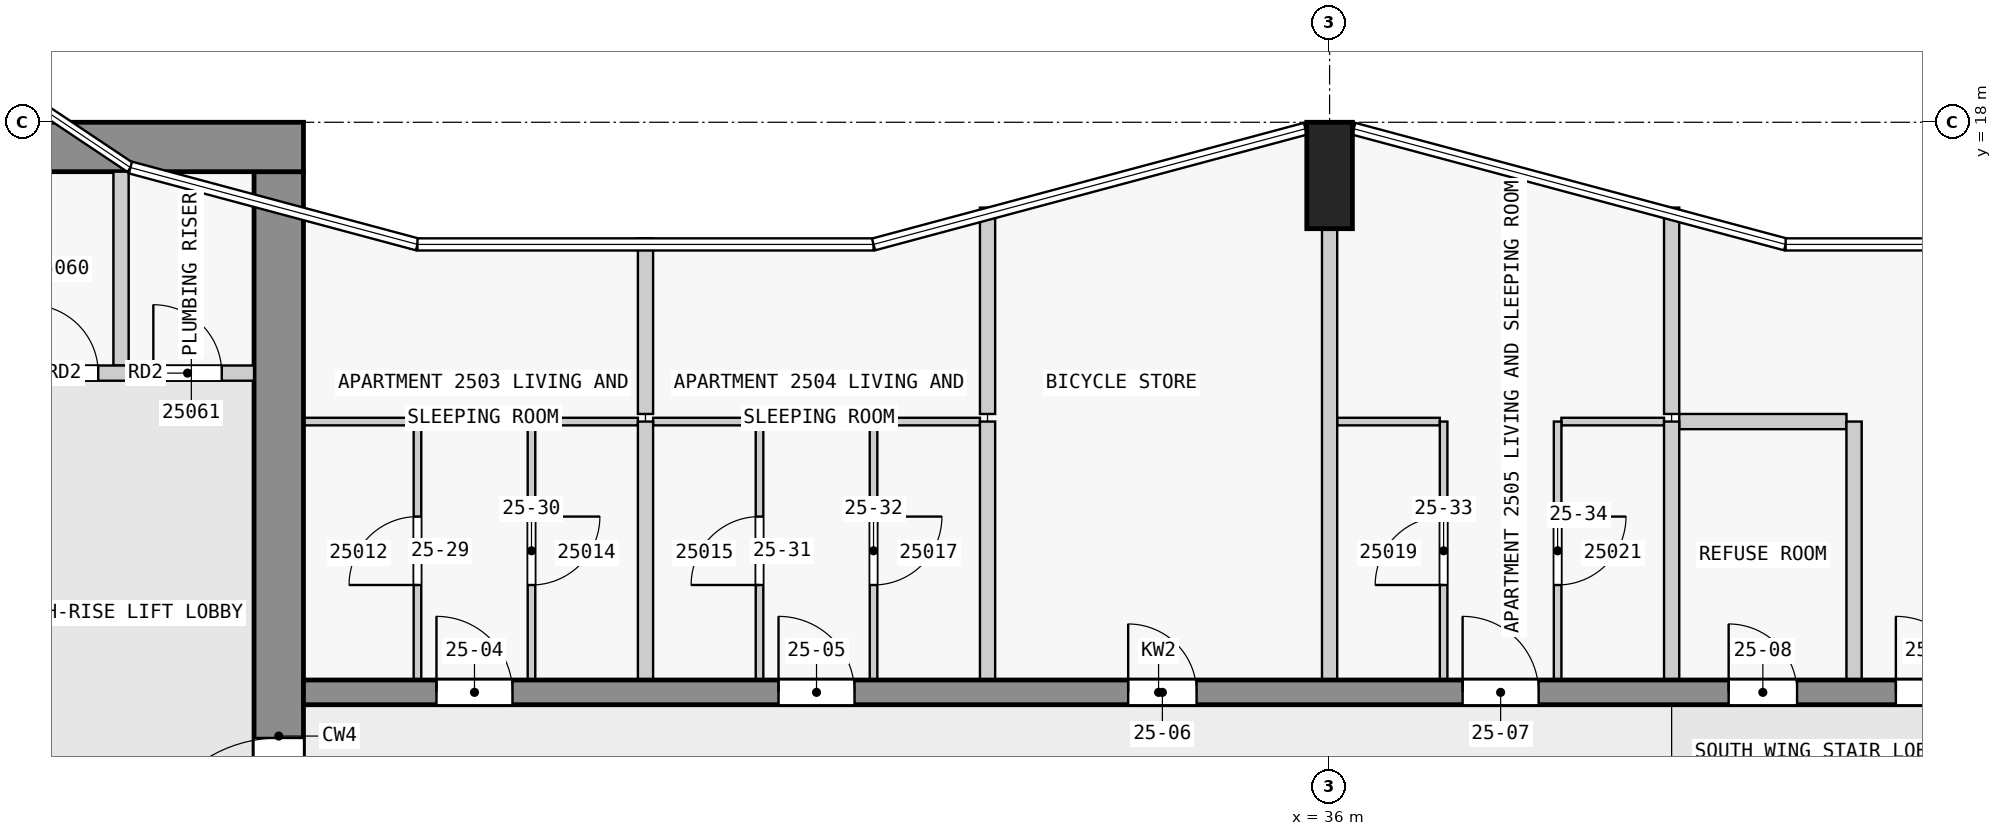
"""IFC4 building model, lengths in metres.
Left out: names, types, materials, properties, quantities, classifications, styles, units other than length and angle.
Written with IfcOpenShell. Run it as: python <this file> out.ifc"""

import sys

from ifc_helpers import new_model, si_unit, direction, frame, frame_2d, origin, origin_2d, place, context, subcontext, project, spatial, rectangle, extrude, element, fill, save


model = new_model("IFC4")
c1 = context("Model", 3, precision=1e-05, world=origin(), true_north=direction((0.0, 1.0)))
c2 = subcontext(c1, "Body", "Model", "MODEL_VIEW")
j1 = project(units=[si_unit("LENGTHUNIT", "METRE"), si_unit("PLANEANGLEUNIT", "RADIAN")], contexts=[c1])
p1 = place(None, origin())
s1 = spatial("IfcSite", under=j1, at=p1, CompositionType="ELEMENT")
p2 = place(p1, origin())
s2 = spatial("IfcBuilding", under=s1, at=p2, CompositionType="ELEMENT")
p3 = place(p2, frame((0.0, 0.0, 99.3)))
s3 = spatial("IfcBuildingStorey", under=s2, at=p3, CompositionType="ELEMENT", Elevation=99.3)
p4 = place(p3, frame((36.0, 17.3, 0.0), z_axis=(0.0, 0.0, 1.0), x_axis=(1.0, 0.0, 0.0)))
e1 = element("IfcColumn", 1, at=p4, inside=s3, PredefinedType="COLUMN", context=c2, shape_type="SweptSolid", body=[
    extrude(rectangle(XDim=0.6, YDim=1.4, at=origin_2d()), origin(), (0.0, 0.0, 1.0), 3.5),
])
p5 = place(p3, frame((1.65, 17.675, 0.0), z_axis=(0.0, 0.0, 1.0), x_axis=(1.0, 0.0, 0.0)))
e2 = element("IfcWall", 2, at=p5, inside=s3, PredefinedType="SHEAR", context=c2, shape_type="SweptSolid", body=[
    extrude(rectangle(XDim=20.85, YDim=0.65, at=frame_2d((10.425, 0.0))), origin(), (0.0, 0.0, 1.0), 3.25),
])
p6 = place(p5, frame((6.45, 0.0, 0.0)))
e3 = element("IfcOpeningElement", 3, at=p6, cuts=e2, PredefinedType="OPENING", context=c2, shape_type="SweptSolid", body=[
    extrude(rectangle(XDim=1.8, YDim=2.1, at=frame_2d((0.9, 1.05))), frame((0.0, 0.335, 0.0), z_axis=(0.0, -1.0, 0.0), x_axis=(1.0, 0.0, 0.0)), (0.0, 0.0, 1.0), 0.67),
])
p7 = place(p3, frame((22.175, 2.5, 0.0), z_axis=(0.0, 0.0, 1.0), x_axis=(0.0, 1.0, 0.0)))
e4 = element("IfcWall", 4, at=p7, inside=s3, PredefinedType="SHEAR", context=c2, shape_type="SweptSolid", body=[
    extrude(rectangle(XDim=14.85, YDim=0.65, at=frame_2d((7.425, 0.0))), origin(), (0.0, 0.0, 1.0), 3.25),
])
p8 = place(p7, frame((5.6, 0.0, 0.0)))
e5 = element("IfcOpeningElement", 5, at=p8, cuts=e4, PredefinedType="OPENING", context=c2, shape_type="SweptSolid", body=[
    extrude(rectangle(XDim=1.8, YDim=2.1, at=frame_2d((0.9, 1.05))), frame((0.0, 0.335, 0.0), z_axis=(0.0, -1.0, 0.0), x_axis=(1.0, 0.0, 0.0)), (0.0, 0.0, 1.0), 0.67),
])
p9 = place(p3, frame((22.5, 10.5, 0.0), z_axis=(0.0, 0.0, 1.0), x_axis=(1.0, 0.0, 0.0)))
e6 = element("IfcWall", 6, at=p9, inside=s3, PredefinedType="SHEAR", context=c2, shape_type="SweptSolid", body=[
    extrude(rectangle(XDim=22.5, YDim=0.325, at=frame_2d((11.25, 0.0))), origin(), (0.0, 0.0, 1.0), 3.25),
])
p10 = place(p9, frame((1.75, 0.0, 0.0)))
e7 = element("IfcOpeningElement", 7, at=p10, cuts=e6, PredefinedType="OPENING", context=c2, shape_type="SweptSolid", body=[
    extrude(rectangle(XDim=1.0, YDim=2.1, at=frame_2d((0.5, 1.05))), frame((0.0, 0.172, 0.0), z_axis=(0.0, -1.0, 0.0), x_axis=(1.0, 0.0, 0.0)), (0.0, 0.0, 1.0), 0.345),
])
p11 = place(p9, frame((6.25, 0.0, 0.0)))
e8 = element("IfcOpeningElement", 8, at=p11, cuts=e6, PredefinedType="OPENING", context=c2, shape_type="SweptSolid", body=[
    extrude(rectangle(XDim=1.0, YDim=2.1, at=frame_2d((0.5, 1.05))), frame((0.0, 0.172, 0.0), z_axis=(0.0, -1.0, 0.0), x_axis=(1.0, 0.0, 0.0)), (0.0, 0.0, 1.0), 0.345),
])
p12 = place(p9, frame((10.85, 0.0, 0.0)))
e9 = element("IfcOpeningElement", 9, at=p12, cuts=e6, PredefinedType="OPENING", context=c2, shape_type="SweptSolid", body=[
    extrude(rectangle(XDim=0.9, YDim=2.1, at=frame_2d((0.45, 1.05))), frame((0.0, 0.172, 0.0), z_axis=(0.0, -1.0, 0.0), x_axis=(1.0, 0.0, 0.0)), (0.0, 0.0, 1.0), 0.345),
])
p13 = place(p9, frame((15.25, 0.0, 0.0)))
e10 = element("IfcOpeningElement", 10, at=p13, cuts=e6, PredefinedType="OPENING", context=c2, shape_type="SweptSolid", body=[
    extrude(rectangle(XDim=1.0, YDim=2.1, at=frame_2d((0.5, 1.05))), frame((0.0, 0.172, 0.0), z_axis=(0.0, -1.0, 0.0), x_axis=(1.0, 0.0, 0.0)), (0.0, 0.0, 1.0), 0.345),
])
p14 = place(p9, frame((18.75, 0.0, 0.0)))
e11 = element("IfcOpeningElement", 11, at=p14, cuts=e6, PredefinedType="OPENING", context=c2, shape_type="SweptSolid", body=[
    extrude(rectangle(XDim=0.9, YDim=2.1, at=frame_2d((0.45, 1.05))), frame((0.0, 0.172, 0.0), z_axis=(0.0, -1.0, 0.0), x_axis=(1.0, 0.0, 0.0)), (0.0, 0.0, 1.0), 0.345),
])
p15 = place(p9, frame((20.95, 0.0, 0.0)))
e12 = element("IfcOpeningElement", 12, at=p15, cuts=e6, PredefinedType="OPENING", context=c2, shape_type="SweptSolid", body=[
    extrude(rectangle(XDim=1.0, YDim=2.1, at=frame_2d((0.5, 1.05))), frame((0.0, 0.172, 0.0), z_axis=(0.0, -1.0, 0.0), x_axis=(1.0, 0.0, 0.0)), (0.0, 0.0, 1.0), 0.345),
])
p16 = place(p3, frame((18.6, 14.7, 0.0), z_axis=(0.0, 0.0, 1.0), x_axis=(1.0, 0.0, 0.0)))
e13 = element("IfcWall", 13, at=p16, inside=s3, PredefinedType="PARTITIONING", context=c2, shape_type="SweptSolid", body=[
    extrude(rectangle(XDim=3.25, YDim=0.2, at=frame_2d((1.625, 0.0))), origin(), (0.0, 0.0, 1.0), 3.25),
])
p17 = place(p16, frame((0.3, 0.0, 0.0)))
e14 = element("IfcOpeningElement", 14, at=p17, cuts=e13, PredefinedType="OPENING", context=c2, shape_type="SweptSolid", body=[
    extrude(rectangle(XDim=0.9, YDim=2.1, at=frame_2d((0.45, 1.05))), frame((0.0, 0.11, 0.0), z_axis=(0.0, -1.0, 0.0), x_axis=(1.0, 0.0, 0.0)), (0.0, 0.0, 1.0), 0.22),
])
p18 = place(p16, frame((1.925, 0.0, 0.0)))
e15 = element("IfcOpeningElement", 15, at=p18, cuts=e13, PredefinedType="OPENING", context=c2, shape_type="SweptSolid", body=[
    extrude(rectangle(XDim=0.9, YDim=2.1, at=frame_2d((0.45, 1.05))), frame((0.0, 0.11, 0.0), z_axis=(0.0, -1.0, 0.0), x_axis=(1.0, 0.0, 0.0)), (0.0, 0.0, 1.0), 0.22),
])
p19 = place(p3, frame((20.1, 14.8, 0.0), z_axis=(0.0, 0.0, 1.0), x_axis=(0.0, 1.0, 0.0)))
e16 = element("IfcWall", 16, at=p19, inside=s3, PredefinedType="PARTITIONING", context=c2, shape_type="SweptSolid", body=[
    extrude(rectangle(XDim=2.55, YDim=0.2, at=frame_2d((1.275, 0.0))), origin(), (0.0, 0.0, 1.0), 3.25),
])
p20 = place(p3, frame((23.95, 14.062, 0.0), z_axis=(0.0, 0.0, 1.0), x_axis=(-1.0, 0.0, 0.0)))
e17 = element("IfcWall", 17, at=p20, inside=s3, PredefinedType="PARTITIONING", context=c2, shape_type="SweptSolid", body=[
    extrude(rectangle(XDim=1.45, YDim=0.1, at=frame_2d((0.725, 0.0))), origin(), (0.0, 0.0, 1.0), 3.25),
])
for number, where, z_axis, x_axis in (
    (18, (26.9, 14.062, 0.0), (0.0, 0.0, 1.0), (-1.0, 0.0, 0.0)),
    (19, (28.45, 14.062, 0.0), (0.0, 0.0, 1.0), (-1.0, 0.0, 0.0)),
    (20, (31.4, 14.062, 0.0), (0.0, 0.0, 1.0), (-1.0, 0.0, 0.0)),
    (21, (37.45, 14.062, 0.0), (0.0, 0.0, 1.0), (-1.0, 0.0, 0.0)),
    (22, (40.4, 14.062, 0.0), (0.0, 0.0, 1.0), (-1.0, 0.0, 0.0)),
):
    element("IfcWall", number, at=place(p3, frame(where, z_axis=z_axis, x_axis=x_axis)), inside=s3, PredefinedType="PARTITIONING", context=c2, shape_type="SweptSolid", body=[
        extrude(rectangle(XDim=1.35, YDim=0.1, at=frame_2d((0.675, 0.0))), origin(), (0.0, 0.0, 1.0), 3.25),
    ])
p21 = place(p3, frame((42.8, 14.062, 0.0), z_axis=(0.0, 0.0, 1.0), x_axis=(-1.0, 0.0, 0.0)))
e23 = element("IfcWall", 23, at=p21, inside=s3, PredefinedType="PARTITIONING", context=c2, shape_type="SweptSolid", body=[
    extrude(rectangle(XDim=2.2, YDim=0.2, at=frame_2d((1.1, 0.0))), origin(), (0.0, 0.0, 1.0), 3.25),
])
p22 = place(p3, frame((24.0, 10.663, 0.0), z_axis=(0.0, 0.0, 1.0), x_axis=(0.0, 1.0, 0.0)))
e24 = element("IfcWall", 24, at=p22, inside=s3, PredefinedType="PARTITIONING", context=c2, shape_type="SweptSolid", body=[
    extrude(rectangle(XDim=3.4, YDim=0.1, at=frame_2d((1.7, 0.0))), origin(), (0.0, 0.0, 1.0), 3.25),
])
p23 = place(p22, frame((1.25, 0.0, 0.0)))
e25 = element("IfcOpeningElement", 25, at=p23, cuts=e24, PredefinedType="OPENING", context=c2, shape_type="SweptSolid", body=[
    extrude(rectangle(XDim=0.9, YDim=2.1, at=frame_2d((0.45, 1.05))), frame((0.0, 0.06, 0.0), z_axis=(0.0, -1.0, 0.0), x_axis=(1.0, 0.0, 0.0)), (0.0, 0.0, 1.0), 0.12),
])
p24 = place(p3, frame((25.5, 14.062, 0.0), z_axis=(0.0, 0.0, 1.0), x_axis=(0.0, -1.0, 0.0)))
e26 = element("IfcWall", 26, at=p24, inside=s3, PredefinedType="PARTITIONING", context=c2, shape_type="SweptSolid", body=[
    extrude(rectangle(XDim=3.4, YDim=0.1, at=frame_2d((1.7, 0.0))), origin(), (0.0, 0.0, 1.0), 3.25),
])
p25 = place(p24, frame((1.25, 0.0, 0.0)))
e27 = element("IfcOpeningElement", 27, at=p25, cuts=e26, PredefinedType="OPENING", context=c2, shape_type="SweptSolid", body=[
    extrude(rectangle(XDim=0.9, YDim=2.1, at=frame_2d((0.45, 1.05))), frame((0.0, 0.06, 0.0), z_axis=(0.0, -1.0, 0.0), x_axis=(1.0, 0.0, 0.0)), (0.0, 0.0, 1.0), 0.12),
])
p26 = place(p3, frame((27.0, 16.473, 0.0), z_axis=(0.0, 0.0, 1.0), x_axis=(0.0, -1.0, 0.0)))
e28 = element("IfcWall", 28, at=p26, inside=s3, PredefinedType="PARTITIONING", context=c2, shape_type="SweptSolid", body=[
    extrude(rectangle(XDim=2.311, YDim=0.2, at=frame_2d((1.155, 0.0))), origin(), (0.0, 0.0, 1.0), 3.25),
])
p27 = place(p3, frame((27.0, 10.663, 0.0), z_axis=(0.0, 0.0, 1.0), x_axis=(0.0, 1.0, 0.0)))
e29 = element("IfcWall", 29, at=p27, inside=s3, PredefinedType="PARTITIONING", context=c2, shape_type="SweptSolid", body=[
    extrude(rectangle(XDim=3.4, YDim=0.2, at=frame_2d((1.7, 0.0))), origin(), (0.0, 0.0, 1.0), 3.25),
])
p28 = place(p3, frame((28.5, 10.663, 0.0), z_axis=(0.0, 0.0, 1.0), x_axis=(0.0, 1.0, 0.0)))
e30 = element("IfcWall", 30, at=p28, inside=s3, PredefinedType="PARTITIONING", context=c2, shape_type="SweptSolid", body=[
    extrude(rectangle(XDim=3.4, YDim=0.1, at=frame_2d((1.7, 0.0))), origin(), (0.0, 0.0, 1.0), 3.25),
])
p29 = place(p28, frame((1.25, 0.0, 0.0)))
e31 = element("IfcOpeningElement", 31, at=p29, cuts=e30, PredefinedType="OPENING", context=c2, shape_type="SweptSolid", body=[
    extrude(rectangle(XDim=0.9, YDim=2.1, at=frame_2d((0.45, 1.05))), frame((0.0, 0.06, 0.0), z_axis=(0.0, -1.0, 0.0), x_axis=(1.0, 0.0, 0.0)), (0.0, 0.0, 1.0), 0.12),
])
p30 = place(p3, frame((30.0, 14.062, 0.0), z_axis=(0.0, 0.0, 1.0), x_axis=(0.0, -1.0, 0.0)))
e32 = element("IfcWall", 32, at=p30, inside=s3, PredefinedType="PARTITIONING", context=c2, shape_type="SweptSolid", body=[
    extrude(rectangle(XDim=3.4, YDim=0.1, at=frame_2d((1.7, 0.0))), origin(), (0.0, 0.0, 1.0), 3.25),
])
p31 = place(p30, frame((1.25, 0.0, 0.0)))
e33 = element("IfcOpeningElement", 33, at=p31, cuts=e32, PredefinedType="OPENING", context=c2, shape_type="SweptSolid", body=[
    extrude(rectangle(XDim=0.9, YDim=2.1, at=frame_2d((0.45, 1.05))), frame((0.0, 0.06, 0.0), z_axis=(0.0, -1.0, 0.0), x_axis=(1.0, 0.0, 0.0)), (0.0, 0.0, 1.0), 0.12),
])
p32 = place(p3, frame((31.5, 16.878, 0.0), z_axis=(0.0, 0.0, 1.0), x_axis=(0.0, -1.0, 0.0)))
e34 = element("IfcWall", 34, at=p32, inside=s3, PredefinedType="PARTITIONING", context=c2, shape_type="SweptSolid", body=[
    extrude(rectangle(XDim=2.715, YDim=0.2, at=frame_2d((1.357, 0.0))), origin(), (0.0, 0.0, 1.0), 3.25),
])
p33 = place(p3, frame((31.5, 10.663, 0.0), z_axis=(0.0, 0.0, 1.0), x_axis=(0.0, 1.0, 0.0)))
e35 = element("IfcWall", 35, at=p33, inside=s3, PredefinedType="PARTITIONING", context=c2, shape_type="SweptSolid", body=[
    extrude(rectangle(XDim=3.4, YDim=0.2, at=frame_2d((1.7, 0.0))), origin(), (0.0, 0.0, 1.0), 3.25),
])
p34 = place(p3, frame((36.0, 10.663, 0.0), z_axis=(0.0, 0.0, 1.0), x_axis=(0.0, 1.0, 0.0)))
e36 = element("IfcWall", 36, at=p34, inside=s3, PredefinedType="PARTITIONING", context=c2, shape_type="SweptSolid", body=[
    extrude(rectangle(XDim=5.938, YDim=0.2, at=frame_2d((2.969, 0.0))), origin(), (0.0, 0.0, 1.0), 3.25),
])
p35 = place(p3, frame((37.5, 10.663, 0.0), z_axis=(0.0, 0.0, 1.0), x_axis=(0.0, 1.0, 0.0)))
e37 = element("IfcWall", 37, at=p35, inside=s3, PredefinedType="PARTITIONING", context=c2, shape_type="SweptSolid", body=[
    extrude(rectangle(XDim=3.4, YDim=0.1, at=frame_2d((1.7, 0.0))), origin(), (0.0, 0.0, 1.0), 3.25),
])
p36 = place(p35, frame((1.25, 0.0, 0.0)))
e38 = element("IfcOpeningElement", 38, at=p36, cuts=e37, PredefinedType="OPENING", context=c2, shape_type="SweptSolid", body=[
    extrude(rectangle(XDim=0.9, YDim=2.1, at=frame_2d((0.45, 1.05))), frame((0.0, 0.06, 0.0), z_axis=(0.0, -1.0, 0.0), x_axis=(1.0, 0.0, 0.0)), (0.0, 0.0, 1.0), 0.12),
])
p37 = place(p3, frame((39.0, 14.062, 0.0), z_axis=(0.0, 0.0, 1.0), x_axis=(0.0, -1.0, 0.0)))
e39 = element("IfcWall", 39, at=p37, inside=s3, PredefinedType="PARTITIONING", context=c2, shape_type="SweptSolid", body=[
    extrude(rectangle(XDim=3.4, YDim=0.1, at=frame_2d((1.7, 0.0))), origin(), (0.0, 0.0, 1.0), 3.25),
])
p38 = place(p37, frame((1.25, 0.0, 0.0)))
e40 = element("IfcOpeningElement", 40, at=p38, cuts=e39, PredefinedType="OPENING", context=c2, shape_type="SweptSolid", body=[
    extrude(rectangle(XDim=0.9, YDim=2.1, at=frame_2d((0.45, 1.05))), frame((0.0, 0.06, 0.0), z_axis=(0.0, -1.0, 0.0), x_axis=(1.0, 0.0, 0.0)), (0.0, 0.0, 1.0), 0.12),
])
p39 = place(p3, frame((40.5, 16.878, 0.0), z_axis=(0.0, 0.0, 1.0), x_axis=(0.0, -1.0, 0.0)))
e41 = element("IfcWall", 41, at=p39, inside=s3, PredefinedType="PARTITIONING", context=c2, shape_type="SweptSolid", body=[
    extrude(rectangle(XDim=2.715, YDim=0.2, at=frame_2d((1.357, 0.0))), origin(), (0.0, 0.0, 1.0), 3.25),
])
for number, where, z_axis, x_axis in (
    (42, (40.5, 10.663, 0.0), (0.0, 0.0, 1.0), (0.0, 1.0, 0.0)),
    (43, (42.9, 10.663, 0.0), (0.0, 0.0, 1.0), (0.0, 1.0, 0.0)),
):
    element("IfcWall", number, at=place(p3, frame(where, z_axis=z_axis, x_axis=x_axis)), inside=s3, PredefinedType="PARTITIONING", context=c2, shape_type="SweptSolid", body=[
        extrude(rectangle(XDim=3.4, YDim=0.2, at=frame_2d((1.7, 0.0))), origin(), (0.0, 0.0, 1.0), 3.25),
    ])
p40 = place(p8, origin())
e44 = element("IfcDoor", 44, at=p40, inside=s3, OperationType="DOUBLE_DOOR_SINGLE_SWING", PredefinedType="DOOR", context=c2, shape_type="SweptSolid", body=[
    extrude(rectangle(XDim=1.8, YDim=2.1, at=frame_2d((0.9, 1.05))), frame((0.0, 0.025, 0.0), z_axis=(0.0, -1.0, 0.0), x_axis=(1.0, 0.0, 0.0)), (0.0, 0.0, 1.0), 0.05),
])
fill(e5, e44)
p41 = place(p17, origin())
e45 = element("IfcDoor", 45, at=p41, inside=s3, OperationType="SINGLE_SWING_LEFT", PredefinedType="DOOR", context=c2, shape_type="SweptSolid", body=[
    extrude(rectangle(XDim=0.9, YDim=2.1, at=frame_2d((0.45, 1.05))), frame((0.0, 0.025, 0.0), z_axis=(0.0, -1.0, 0.0), x_axis=(1.0, 0.0, 0.0)), (0.0, 0.0, 1.0), 0.05),
])
fill(e14, e45)
p42 = place(p18, origin())
e46 = element("IfcDoor", 46, at=p42, inside=s3, OperationType="SINGLE_SWING_LEFT", PredefinedType="DOOR", context=c2, shape_type="SweptSolid", body=[
    extrude(rectangle(XDim=0.9, YDim=2.1, at=frame_2d((0.45, 1.05))), frame((0.0, 0.025, 0.0), z_axis=(0.0, -1.0, 0.0), x_axis=(1.0, 0.0, 0.0)), (0.0, 0.0, 1.0), 0.05),
])
fill(e15, e46)
p43 = place(p10, origin())
e47 = element("IfcDoor", 47, at=p43, inside=s3, OperationType="SINGLE_SWING_LEFT", PredefinedType="DOOR", context=c2, shape_type="SweptSolid", body=[
    extrude(rectangle(XDim=1.0, YDim=2.1, at=frame_2d((0.5, 1.05))), frame((0.0, 0.025, 0.0), z_axis=(0.0, -1.0, 0.0), x_axis=(1.0, 0.0, 0.0)), (0.0, 0.0, 1.0), 0.05),
])
fill(e7, e47)
p44 = place(p11, origin())
e48 = element("IfcDoor", 48, at=p44, inside=s3, OperationType="SINGLE_SWING_LEFT", PredefinedType="DOOR", context=c2, shape_type="SweptSolid", body=[
    extrude(rectangle(XDim=1.0, YDim=2.1, at=frame_2d((0.5, 1.05))), frame((0.0, 0.025, 0.0), z_axis=(0.0, -1.0, 0.0), x_axis=(1.0, 0.0, 0.0)), (0.0, 0.0, 1.0), 0.05),
])
fill(e8, e48)
p45 = place(p12, origin())
e49 = element("IfcDoor", 49, at=p45, inside=s3, OperationType="SINGLE_SWING_RIGHT", PredefinedType="DOOR", context=c2, shape_type="SweptSolid", body=[
    extrude(rectangle(XDim=0.9, YDim=2.1, at=frame_2d((0.45, 1.05))), frame((0.0, 0.025, 0.0), z_axis=(0.0, -1.0, 0.0), x_axis=(1.0, 0.0, 0.0)), (0.0, 0.0, 1.0), 0.05),
])
fill(e9, e49)
p46 = place(p13, origin())
e50 = element("IfcDoor", 50, at=p46, inside=s3, OperationType="SINGLE_SWING_RIGHT", PredefinedType="DOOR", context=c2, shape_type="SweptSolid", body=[
    extrude(rectangle(XDim=1.0, YDim=2.1, at=frame_2d((0.5, 1.05))), frame((0.0, 0.025, 0.0), z_axis=(0.0, -1.0, 0.0), x_axis=(1.0, 0.0, 0.0)), (0.0, 0.0, 1.0), 0.05),
])
fill(e10, e50)
p47 = place(p14, origin())
e51 = element("IfcDoor", 51, at=p47, inside=s3, OperationType="SINGLE_SWING_RIGHT", PredefinedType="DOOR", context=c2, shape_type="SweptSolid", body=[
    extrude(rectangle(XDim=0.9, YDim=2.1, at=frame_2d((0.45, 1.05))), frame((0.0, 0.025, 0.0), z_axis=(0.0, -1.0, 0.0), x_axis=(1.0, 0.0, 0.0)), (0.0, 0.0, 1.0), 0.05),
])
fill(e11, e51)
p48 = place(p15, origin())
e52 = element("IfcDoor", 52, at=p48, inside=s3, OperationType="SINGLE_SWING_RIGHT", PredefinedType="DOOR", context=c2, shape_type="SweptSolid", body=[
    extrude(rectangle(XDim=1.0, YDim=2.1, at=frame_2d((0.5, 1.05))), frame((0.0, 0.025, 0.0), z_axis=(0.0, -1.0, 0.0), x_axis=(1.0, 0.0, 0.0)), (0.0, 0.0, 1.0), 0.05),
])
fill(e12, e52)
p49 = place(p23, origin())
e53 = element("IfcDoor", 53, at=p49, inside=s3, OperationType="SINGLE_SWING_LEFT", PredefinedType="DOOR", context=c2, shape_type="SweptSolid", body=[
    extrude(rectangle(XDim=0.9, YDim=2.1, at=frame_2d((0.45, 1.05))), frame((0.0, 0.025, 0.0), z_axis=(0.0, -1.0, 0.0), x_axis=(1.0, 0.0, 0.0)), (0.0, 0.0, 1.0), 0.05),
])
fill(e25, e53)
p50 = place(p25, origin())
e54 = element("IfcDoor", 54, at=p50, inside=s3, OperationType="SINGLE_SWING_LEFT", PredefinedType="DOOR", context=c2, shape_type="SweptSolid", body=[
    extrude(rectangle(XDim=0.9, YDim=2.1, at=frame_2d((0.45, 1.05))), frame((0.0, 0.025, 0.0), z_axis=(0.0, -1.0, 0.0), x_axis=(1.0, 0.0, 0.0)), (0.0, 0.0, 1.0), 0.05),
])
fill(e27, e54)
p51 = place(p29, origin())
e55 = element("IfcDoor", 55, at=p51, inside=s3, OperationType="SINGLE_SWING_LEFT", PredefinedType="DOOR", context=c2, shape_type="SweptSolid", body=[
    extrude(rectangle(XDim=0.9, YDim=2.1, at=frame_2d((0.45, 1.05))), frame((0.0, 0.025, 0.0), z_axis=(0.0, -1.0, 0.0), x_axis=(1.0, 0.0, 0.0)), (0.0, 0.0, 1.0), 0.05),
])
fill(e31, e55)
p52 = place(p31, origin())
e56 = element("IfcDoor", 56, at=p52, inside=s3, OperationType="SINGLE_SWING_LEFT", PredefinedType="DOOR", context=c2, shape_type="SweptSolid", body=[
    extrude(rectangle(XDim=0.9, YDim=2.1, at=frame_2d((0.45, 1.05))), frame((0.0, 0.025, 0.0), z_axis=(0.0, -1.0, 0.0), x_axis=(1.0, 0.0, 0.0)), (0.0, 0.0, 1.0), 0.05),
])
fill(e33, e56)
p53 = place(p36, origin())
e57 = element("IfcDoor", 57, at=p53, inside=s3, OperationType="SINGLE_SWING_LEFT", PredefinedType="DOOR", context=c2, shape_type="SweptSolid", body=[
    extrude(rectangle(XDim=0.9, YDim=2.1, at=frame_2d((0.45, 1.05))), frame((0.0, 0.025, 0.0), z_axis=(0.0, -1.0, 0.0), x_axis=(1.0, 0.0, 0.0)), (0.0, 0.0, 1.0), 0.05),
])
fill(e38, e57)
p54 = place(p38, origin())
e58 = element("IfcDoor", 58, at=p54, inside=s3, OperationType="SINGLE_SWING_LEFT", PredefinedType="DOOR", context=c2, shape_type="SweptSolid", body=[
    extrude(rectangle(XDim=0.9, YDim=2.1, at=frame_2d((0.45, 1.05))), frame((0.0, 0.025, 0.0), z_axis=(0.0, -1.0, 0.0), x_axis=(1.0, 0.0, 0.0)), (0.0, 0.0, 1.0), 0.05),
])
fill(e40, e58)
save(model, sys.argv[1])
